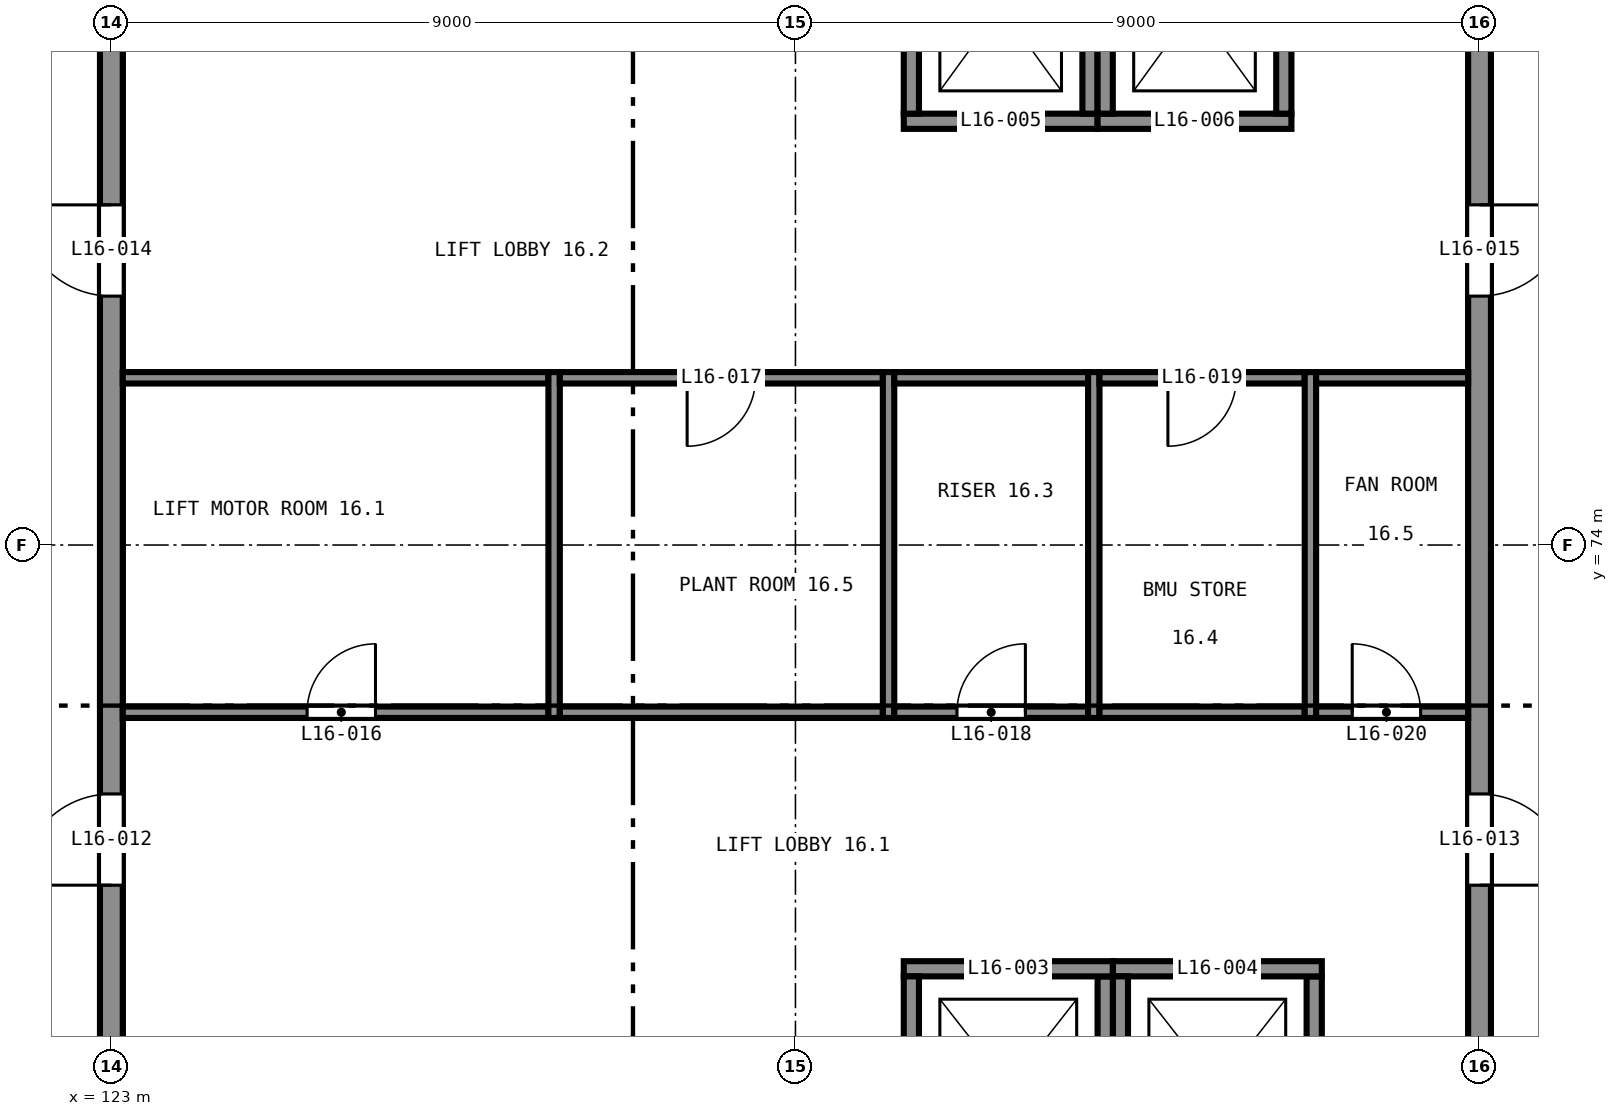
"""IFC4 building model, lengths in metres.
Left out: names, types, materials, properties, quantities, classifications, styles, units other than length and angle.
Written with IfcOpenShell. Run it as: python <this file> out.ifc"""

import sys

from ifc_helpers import new_model, si_unit, direction, frame, frame_2d, origin, place, context, subcontext, project, spatial, rectangle, extrude, element, fill, save


model = new_model("IFC4")
c1 = context("Model", 3, precision=1e-05, world=origin(), true_north=direction((0.0, 1.0)))
c2 = subcontext(c1, "Body", "Model", "MODEL_VIEW")
j1 = project(units=[si_unit("LENGTHUNIT", "METRE"), si_unit("PLANEANGLEUNIT", "RADIAN")], contexts=[c1])
p1 = place(None, origin())
s1 = spatial("IfcSite", under=j1, at=p1, CompositionType="ELEMENT")
p2 = place(p1, origin())
s2 = spatial("IfcBuilding", under=s1, at=p2, CompositionType="ELEMENT")
p3 = place(p2, frame((0.0, 0.0, 65.5)))
s3 = spatial("IfcBuildingStorey", under=s2, at=p3, CompositionType="ELEMENT", Elevation=65.5)
p4 = place(p3, frame((141.0, 65.15, 0.0), z_axis=(0.0, 0.0, 1.0), x_axis=(0.0, 1.0, 0.0)))
e1 = element("IfcWall", 1, at=p4, inside=s3, PredefinedType="SHEAR", context=c2, shape_type="SweptSolid", body=[
    extrude(rectangle(XDim=17.7, YDim=0.3, at=frame_2d((8.85, 0.0))), origin(), (0.0, 0.0, 1.0), 4.7),
])
p5 = place(p4, frame((4.375, 0.0, 0.0)))
e2 = element("IfcOpeningElement", 2, at=p5, cuts=e1, PredefinedType="OPENING", context=c2, shape_type="SweptSolid", body=[
    extrude(rectangle(XDim=1.2, YDim=2.1, at=frame_2d((0.6, 1.05))), frame((0.0, 0.16, 0.0), z_axis=(0.0, -1.0, 0.0), x_axis=(1.0, 0.0, 0.0)), (0.0, 0.0, 1.0), 0.32),
])
p6 = place(p4, frame((12.125, 0.0, 0.0)))
e3 = element("IfcOpeningElement", 3, at=p6, cuts=e1, PredefinedType="OPENING", context=c2, shape_type="SweptSolid", body=[
    extrude(rectangle(XDim=1.2, YDim=2.1, at=frame_2d((0.6, 1.05))), frame((0.0, 0.16, 0.0), z_axis=(0.0, -1.0, 0.0), x_axis=(1.0, 0.0, 0.0)), (0.0, 0.0, 1.0), 0.32),
])
p7 = place(p3, frame((123.0, 82.85, 0.0), z_axis=(0.0, 0.0, 1.0), x_axis=(0.0, -1.0, 0.0)))
e4 = element("IfcWall", 4, at=p7, inside=s3, PredefinedType="SHEAR", context=c2, shape_type="SweptSolid", body=[
    extrude(rectangle(XDim=17.7, YDim=0.3, at=frame_2d((8.85, 0.0))), origin(), (0.0, 0.0, 1.0), 4.7),
])
p8 = place(p7, frame((12.125, 0.0, 0.0)))
e5 = element("IfcOpeningElement", 5, at=p8, cuts=e4, PredefinedType="OPENING", context=c2, shape_type="SweptSolid", body=[
    extrude(rectangle(XDim=1.2, YDim=2.1, at=frame_2d((0.6, 1.05))), frame((0.0, 0.16, 0.0), z_axis=(0.0, -1.0, 0.0), x_axis=(1.0, 0.0, 0.0)), (0.0, 0.0, 1.0), 0.32),
])
p9 = place(p7, frame((4.375, 0.0, 0.0)))
e6 = element("IfcOpeningElement", 6, at=p9, cuts=e4, PredefinedType="OPENING", context=c2, shape_type="SweptSolid", body=[
    extrude(rectangle(XDim=1.2, YDim=2.1, at=frame_2d((0.6, 1.05))), frame((0.0, 0.16, 0.0), z_axis=(0.0, -1.0, 0.0), x_axis=(1.0, 0.0, 0.0)), (0.0, 0.0, 1.0), 0.32),
])
p10 = place(p3, frame((136.075, 65.425, 0.0), z_axis=(0.0, 0.0, 1.0), x_axis=(0.0, 1.0, 0.0)))
e7 = element("IfcWall", 7, at=p10, inside=s3, PredefinedType="SHEAR", context=c2, shape_type="SweptSolid", body=[
    extrude(rectangle(XDim=2.9, YDim=0.2, at=frame_2d((1.45, 0.0))), origin(), (0.0, 0.0, 1.0), 4.7),
])
p11 = place(p3, frame((136.175, 68.425, 0.0), z_axis=(0.0, 0.0, 1.0), x_axis=(-1.0, 0.0, 0.0)))
e8 = element("IfcWall", 8, at=p11, inside=s3, PredefinedType="SHEAR", context=c2, shape_type="SweptSolid", body=[
    extrude(rectangle(XDim=2.75, YDim=0.2, at=frame_2d((1.375, 0.0))), origin(), (0.0, 0.0, 1.0), 4.7),
])
p12 = place(p11, frame((0.825, 0.0, 0.0)))
e9 = element("IfcOpeningElement", 9, at=p12, cuts=e8, PredefinedType="OPENING", context=c2, shape_type="SweptSolid", body=[
    extrude(rectangle(XDim=1.1, YDim=2.1, at=frame_2d((0.55, 1.05))), frame((0.0, 0.11, 0.0), z_axis=(0.0, -1.0, 0.0), x_axis=(1.0, 0.0, 0.0)), (0.0, 0.0, 1.0), 0.22),
])
for number, where, z_axis, x_axis in (
    (10, (133.525, 68.325, 0.0), (0.0, 0.0, 1.0), (0.0, -1.0, 0.0)),
    (11, (138.825, 65.425, 0.0), (0.0, 0.0, 1.0), (0.0, 1.0, 0.0)),
):
    element("IfcWall", number, at=place(p3, frame(where, z_axis=z_axis, x_axis=x_axis)), inside=s3, PredefinedType="SHEAR", context=c2, shape_type="SweptSolid", body=[
        extrude(rectangle(XDim=2.9, YDim=0.2, at=frame_2d((1.45, 0.0))), origin(), (0.0, 0.0, 1.0), 4.7),
    ])
p13 = place(p3, frame((138.925, 68.425, 0.0), z_axis=(0.0, 0.0, 1.0), x_axis=(-1.0, 0.0, 0.0)))
e12 = element("IfcWall", 12, at=p13, inside=s3, PredefinedType="SHEAR", context=c2, shape_type="SweptSolid", body=[
    extrude(rectangle(XDim=2.75, YDim=0.2, at=frame_2d((1.375, 0.0))), origin(), (0.0, 0.0, 1.0), 4.7),
])
p14 = place(p13, frame((0.825, 0.0, 0.0)))
e13 = element("IfcOpeningElement", 13, at=p14, cuts=e12, PredefinedType="OPENING", context=c2, shape_type="SweptSolid", body=[
    extrude(rectangle(XDim=1.1, YDim=2.1, at=frame_2d((0.55, 1.05))), frame((0.0, 0.11, 0.0), z_axis=(0.0, -1.0, 0.0), x_axis=(1.0, 0.0, 0.0)), (0.0, 0.0, 1.0), 0.22),
])
p15 = place(p3, frame((136.275, 68.325, 0.0), z_axis=(0.0, 0.0, 1.0), x_axis=(0.0, -1.0, 0.0)))
e14 = element("IfcWall", 14, at=p15, inside=s3, PredefinedType="SHEAR", context=c2, shape_type="SweptSolid", body=[
    extrude(rectangle(XDim=2.9, YDim=0.2, at=frame_2d((1.45, 0.0))), origin(), (0.0, 0.0, 1.0), 4.7),
])
p16 = place(p3, frame((133.425, 79.575, 0.0), z_axis=(0.0, 0.0, 1.0), x_axis=(1.0, 0.0, 0.0)))
e15 = element("IfcWall", 15, at=p16, inside=s3, PredefinedType="SHEAR", context=c2, shape_type="SweptSolid", body=[
    extrude(rectangle(XDim=2.55, YDim=0.2, at=frame_2d((1.275, 0.0))), origin(), (0.0, 0.0, 1.0), 4.7),
])
p17 = place(p16, frame((0.725, 0.0, 0.0)))
e16 = element("IfcOpeningElement", 16, at=p17, cuts=e15, PredefinedType="OPENING", context=c2, shape_type="SweptSolid", body=[
    extrude(rectangle(XDim=1.1, YDim=2.1, at=frame_2d((0.55, 1.05))), frame((0.0, 0.11, 0.0), z_axis=(0.0, -1.0, 0.0), x_axis=(1.0, 0.0, 0.0)), (0.0, 0.0, 1.0), 0.22),
])
for number, where, z_axis, x_axis in (
    (17, (135.875, 79.675, 0.0), (0.0, 0.0, 1.0), (0.0, 1.0, 0.0)),
    (18, (133.525, 82.475, 0.0), (0.0, 0.0, 1.0), (0.0, -1.0, 0.0)),
):
    element("IfcWall", number, at=place(p3, frame(where, z_axis=z_axis, x_axis=x_axis)), inside=s3, PredefinedType="SHEAR", context=c2, shape_type="SweptSolid", body=[
        extrude(rectangle(XDim=2.8, YDim=0.2, at=frame_2d((1.4, 0.0))), origin(), (0.0, 0.0, 1.0), 4.7),
    ])
p18 = place(p3, frame((135.975, 79.575, 0.0), z_axis=(0.0, 0.0, 1.0), x_axis=(1.0, 0.0, 0.0)))
e19 = element("IfcWall", 19, at=p18, inside=s3, PredefinedType="SHEAR", context=c2, shape_type="SweptSolid", body=[
    extrude(rectangle(XDim=2.55, YDim=0.2, at=frame_2d((1.275, 0.0))), origin(), (0.0, 0.0, 1.0), 4.7),
])
p19 = place(p18, frame((0.725, 0.0, 0.0)))
e20 = element("IfcOpeningElement", 20, at=p19, cuts=e19, PredefinedType="OPENING", context=c2, shape_type="SweptSolid", body=[
    extrude(rectangle(XDim=1.1, YDim=2.1, at=frame_2d((0.55, 1.05))), frame((0.0, 0.11, 0.0), z_axis=(0.0, -1.0, 0.0), x_axis=(1.0, 0.0, 0.0)), (0.0, 0.0, 1.0), 0.22),
])
for number, where, z_axis, x_axis in (
    (21, (138.425, 79.675, 0.0), (0.0, 0.0, 1.0), (0.0, 1.0, 0.0)),
    (22, (136.075, 82.475, 0.0), (0.0, 0.0, 1.0), (0.0, -1.0, 0.0)),
):
    element("IfcWall", number, at=place(p3, frame(where, z_axis=z_axis, x_axis=x_axis)), inside=s3, PredefinedType="SHEAR", context=c2, shape_type="SweptSolid", body=[
        extrude(rectangle(XDim=2.8, YDim=0.2, at=frame_2d((1.4, 0.0))), origin(), (0.0, 0.0, 1.0), 4.7),
    ])
p20 = place(p3, frame((128.825, 71.725, 0.0), z_axis=(0.0, 0.0, 1.0), x_axis=(0.0, 1.0, 0.0)))
e23 = element("IfcWall", 23, at=p20, inside=s3, PredefinedType="PARTITIONING", context=c2, shape_type="SweptSolid", body=[
    extrude(rectangle(XDim=4.55, YDim=0.15, at=frame_2d((2.275, 0.0))), origin(), (0.0, 0.0, 1.0), 4.7),
])
p21 = place(p3, frame((123.15, 71.8, 0.0), z_axis=(0.0, 0.0, 1.0), x_axis=(1.0, 0.0, 0.0)))
e24 = element("IfcWall", 24, at=p21, inside=s3, PredefinedType="PARTITIONING", context=c2, shape_type="SweptSolid", body=[
    extrude(rectangle(XDim=5.6, YDim=0.15, at=frame_2d((2.8, 0.0))), origin(), (0.0, 0.0, 1.0), 4.7),
])
p22 = place(p21, frame((2.425, 0.0, 0.0)))
e25 = element("IfcOpeningElement", 25, at=p22, cuts=e24, PredefinedType="OPENING", context=c2, shape_type="SweptSolid", body=[
    extrude(rectangle(XDim=0.9, YDim=2.1, at=frame_2d((0.45, 1.05))), frame((0.0, 0.085, 0.0), z_axis=(0.0, -1.0, 0.0), x_axis=(1.0, 0.0, 0.0)), (0.0, 0.0, 1.0), 0.17),
])
p23 = place(p3, frame((123.15, 76.2, 0.0), z_axis=(0.0, 0.0, 1.0), x_axis=(1.0, 0.0, 0.0)))
e26 = element("IfcWall", 26, at=p23, inside=s3, PredefinedType="PARTITIONING", context=c2, shape_type="SweptSolid", body=[
    extrude(rectangle(XDim=5.6, YDim=0.15, at=frame_2d((2.8, 0.0))), origin(), (0.0, 0.0, 1.0), 4.7),
])
p24 = place(p3, frame((133.225, 71.725, 0.0), z_axis=(0.0, 0.0, 1.0), x_axis=(0.0, 1.0, 0.0)))
e27 = element("IfcWall", 27, at=p24, inside=s3, PredefinedType="PARTITIONING", context=c2, shape_type="SweptSolid", body=[
    extrude(rectangle(XDim=4.55, YDim=0.15, at=frame_2d((2.275, 0.0))), origin(), (0.0, 0.0, 1.0), 4.7),
])
p25 = place(p3, frame((128.9, 71.8, 0.0), z_axis=(0.0, 0.0, 1.0), x_axis=(1.0, 0.0, 0.0)))
e28 = element("IfcWall", 28, at=p25, inside=s3, PredefinedType="PARTITIONING", context=c2, shape_type="SweptSolid", body=[
    extrude(rectangle(XDim=4.25, YDim=0.15, at=frame_2d((2.125, 0.0))), origin(), (0.0, 0.0, 1.0), 4.7),
])
p26 = place(p3, frame((128.9, 76.2, 0.0), z_axis=(0.0, 0.0, 1.0), x_axis=(1.0, 0.0, 0.0)))
e29 = element("IfcWall", 29, at=p26, inside=s3, PredefinedType="PARTITIONING", context=c2, shape_type="SweptSolid", body=[
    extrude(rectangle(XDim=4.25, YDim=0.15, at=frame_2d((2.125, 0.0))), origin(), (0.0, 0.0, 1.0), 4.7),
])
p27 = place(p26, frame((1.675, 0.0, 0.0)))
e30 = element("IfcOpeningElement", 30, at=p27, cuts=e29, PredefinedType="OPENING", context=c2, shape_type="SweptSolid", body=[
    extrude(rectangle(XDim=0.9, YDim=2.1, at=frame_2d((0.45, 1.05))), frame((0.0, 0.085, 0.0), z_axis=(0.0, -1.0, 0.0), x_axis=(1.0, 0.0, 0.0)), (0.0, 0.0, 1.0), 0.17),
])
p28 = place(p3, frame((135.925, 71.725, 0.0), z_axis=(0.0, 0.0, 1.0), x_axis=(0.0, 1.0, 0.0)))
e31 = element("IfcWall", 31, at=p28, inside=s3, PredefinedType="PARTITIONING", context=c2, shape_type="SweptSolid", body=[
    extrude(rectangle(XDim=4.55, YDim=0.15, at=frame_2d((2.275, 0.0))), origin(), (0.0, 0.0, 1.0), 4.7),
])
p29 = place(p3, frame((133.3, 71.8, 0.0), z_axis=(0.0, 0.0, 1.0), x_axis=(1.0, 0.0, 0.0)))
e32 = element("IfcWall", 32, at=p29, inside=s3, PredefinedType="PARTITIONING", context=c2, shape_type="SweptSolid", body=[
    extrude(rectangle(XDim=2.55, YDim=0.15, at=frame_2d((1.275, 0.0))), origin(), (0.0, 0.0, 1.0), 4.7),
])
p30 = place(p29, frame((0.825, 0.0, 0.0)))
e33 = element("IfcOpeningElement", 33, at=p30, cuts=e32, PredefinedType="OPENING", context=c2, shape_type="SweptSolid", body=[
    extrude(rectangle(XDim=0.9, YDim=2.1, at=frame_2d((0.45, 1.05))), frame((0.0, 0.085, 0.0), z_axis=(0.0, -1.0, 0.0), x_axis=(1.0, 0.0, 0.0)), (0.0, 0.0, 1.0), 0.17),
])
p31 = place(p3, frame((133.3, 76.2, 0.0), z_axis=(0.0, 0.0, 1.0), x_axis=(1.0, 0.0, 0.0)))
e34 = element("IfcWall", 34, at=p31, inside=s3, PredefinedType="PARTITIONING", context=c2, shape_type="SweptSolid", body=[
    extrude(rectangle(XDim=2.55, YDim=0.15, at=frame_2d((1.275, 0.0))), origin(), (0.0, 0.0, 1.0), 4.7),
])
p32 = place(p3, frame((138.775, 71.725, 0.0), z_axis=(0.0, 0.0, 1.0), x_axis=(0.0, 1.0, 0.0)))
e35 = element("IfcWall", 35, at=p32, inside=s3, PredefinedType="PARTITIONING", context=c2, shape_type="SweptSolid", body=[
    extrude(rectangle(XDim=4.55, YDim=0.15, at=frame_2d((2.275, 0.0))), origin(), (0.0, 0.0, 1.0), 4.7),
])
p33 = place(p3, frame((136.0, 71.8, 0.0), z_axis=(0.0, 0.0, 1.0), x_axis=(1.0, 0.0, 0.0)))
e36 = element("IfcWall", 36, at=p33, inside=s3, PredefinedType="PARTITIONING", context=c2, shape_type="SweptSolid", body=[
    extrude(rectangle(XDim=2.7, YDim=0.15, at=frame_2d((1.35, 0.0))), origin(), (0.0, 0.0, 1.0), 4.7),
])
p34 = place(p3, frame((136.0, 76.2, 0.0), z_axis=(0.0, 0.0, 1.0), x_axis=(1.0, 0.0, 0.0)))
e37 = element("IfcWall", 37, at=p34, inside=s3, PredefinedType="PARTITIONING", context=c2, shape_type="SweptSolid", body=[
    extrude(rectangle(XDim=2.7, YDim=0.15, at=frame_2d((1.35, 0.0))), origin(), (0.0, 0.0, 1.0), 4.7),
])
p35 = place(p34, frame((0.9, 0.0, 0.0)))
e38 = element("IfcOpeningElement", 38, at=p35, cuts=e37, PredefinedType="OPENING", context=c2, shape_type="SweptSolid", body=[
    extrude(rectangle(XDim=0.9, YDim=2.1, at=frame_2d((0.45, 1.05))), frame((0.0, 0.085, 0.0), z_axis=(0.0, -1.0, 0.0), x_axis=(1.0, 0.0, 0.0)), (0.0, 0.0, 1.0), 0.17),
])
p36 = place(p3, frame((138.85, 71.8, 0.0), z_axis=(0.0, 0.0, 1.0), x_axis=(1.0, 0.0, 0.0)))
e39 = element("IfcWall", 39, at=p36, inside=s3, PredefinedType="PARTITIONING", context=c2, shape_type="SweptSolid", body=[
    extrude(rectangle(XDim=2.0, YDim=0.15, at=frame_2d((1.0, 0.0))), origin(), (0.0, 0.0, 1.0), 4.7),
])
p37 = place(p36, frame((0.475, 0.0, 0.0)))
e40 = element("IfcOpeningElement", 40, at=p37, cuts=e39, PredefinedType="OPENING", context=c2, shape_type="SweptSolid", body=[
    extrude(rectangle(XDim=0.9, YDim=2.1, at=frame_2d((0.45, 1.05))), frame((0.0, 0.085, 0.0), z_axis=(0.0, -1.0, 0.0), x_axis=(1.0, 0.0, 0.0)), (0.0, 0.0, 1.0), 0.17),
])
p38 = place(p3, frame((138.85, 76.2, 0.0), z_axis=(0.0, 0.0, 1.0), x_axis=(1.0, 0.0, 0.0)))
e41 = element("IfcWall", 41, at=p38, inside=s3, PredefinedType="PARTITIONING", context=c2, shape_type="SweptSolid", body=[
    extrude(rectangle(XDim=2.0, YDim=0.15, at=frame_2d((1.0, 0.0))), origin(), (0.0, 0.0, 1.0), 4.7),
])
p39 = place(p12, origin())
e42 = element("IfcDoor", 42, at=p39, inside=s3, OperationType="SLIDING_TO_LEFT", PredefinedType="DOOR", context=c2, shape_type="SweptSolid", body=[
    extrude(rectangle(XDim=1.1, YDim=2.1, at=frame_2d((0.55, 1.05))), frame((0.0, 0.025, 0.0), z_axis=(0.0, -1.0, 0.0), x_axis=(1.0, 0.0, 0.0)), (0.0, 0.0, 1.0), 0.05),
])
fill(e9, e42)
p40 = place(p14, origin())
e43 = element("IfcDoor", 43, at=p40, inside=s3, OperationType="SLIDING_TO_LEFT", PredefinedType="DOOR", context=c2, shape_type="SweptSolid", body=[
    extrude(rectangle(XDim=1.1, YDim=2.1, at=frame_2d((0.55, 1.05))), frame((0.0, 0.025, 0.0), z_axis=(0.0, -1.0, 0.0), x_axis=(1.0, 0.0, 0.0)), (0.0, 0.0, 1.0), 0.05),
])
fill(e13, e43)
p41 = place(p17, origin())
e44 = element("IfcDoor", 44, at=p41, inside=s3, OperationType="SLIDING_TO_LEFT", PredefinedType="DOOR", context=c2, shape_type="SweptSolid", body=[
    extrude(rectangle(XDim=1.1, YDim=2.1, at=frame_2d((0.55, 1.05))), frame((0.0, 0.025, 0.0), z_axis=(0.0, -1.0, 0.0), x_axis=(1.0, 0.0, 0.0)), (0.0, 0.0, 1.0), 0.05),
])
fill(e16, e44)
p42 = place(p19, origin())
e45 = element("IfcDoor", 45, at=p42, inside=s3, OperationType="SLIDING_TO_LEFT", PredefinedType="DOOR", context=c2, shape_type="SweptSolid", body=[
    extrude(rectangle(XDim=1.1, YDim=2.1, at=frame_2d((0.55, 1.05))), frame((0.0, 0.025, 0.0), z_axis=(0.0, -1.0, 0.0), x_axis=(1.0, 0.0, 0.0)), (0.0, 0.0, 1.0), 0.05),
])
fill(e20, e45)
p43 = place(p8, frame((1.2, 0.0, 0.0), z_axis=(0.0, 0.0, 1.0), x_axis=(-1.0, 0.0, 0.0)))
e46 = element("IfcDoor", 46, at=p43, inside=s3, OperationType="SINGLE_SWING_RIGHT", PredefinedType="DOOR", context=c2, shape_type="SweptSolid", body=[
    extrude(rectangle(XDim=1.2, YDim=2.1, at=frame_2d((0.6, 1.05))), frame((0.0, 0.025, 0.0), z_axis=(0.0, -1.0, 0.0), x_axis=(1.0, 0.0, 0.0)), (0.0, 0.0, 1.0), 0.05),
])
fill(e5, e46)
p44 = place(p5, frame((1.2, 0.0, 0.0), z_axis=(0.0, 0.0, 1.0), x_axis=(-1.0, 0.0, 0.0)))
e47 = element("IfcDoor", 47, at=p44, inside=s3, OperationType="SINGLE_SWING_LEFT", PredefinedType="DOOR", context=c2, shape_type="SweptSolid", body=[
    extrude(rectangle(XDim=1.2, YDim=2.1, at=frame_2d((0.6, 1.05))), frame((0.0, 0.025, 0.0), z_axis=(0.0, -1.0, 0.0), x_axis=(1.0, 0.0, 0.0)), (0.0, 0.0, 1.0), 0.05),
])
fill(e2, e47)
p45 = place(p9, frame((1.2, 0.0, 0.0), z_axis=(0.0, 0.0, 1.0), x_axis=(-1.0, 0.0, 0.0)))
e48 = element("IfcDoor", 48, at=p45, inside=s3, OperationType="SINGLE_SWING_LEFT", PredefinedType="DOOR", context=c2, shape_type="SweptSolid", body=[
    extrude(rectangle(XDim=1.2, YDim=2.1, at=frame_2d((0.6, 1.05))), frame((0.0, 0.025, 0.0), z_axis=(0.0, -1.0, 0.0), x_axis=(1.0, 0.0, 0.0)), (0.0, 0.0, 1.0), 0.05),
])
fill(e6, e48)
p46 = place(p6, frame((1.2, 0.0, 0.0), z_axis=(0.0, 0.0, 1.0), x_axis=(-1.0, 0.0, 0.0)))
e49 = element("IfcDoor", 49, at=p46, inside=s3, OperationType="SINGLE_SWING_RIGHT", PredefinedType="DOOR", context=c2, shape_type="SweptSolid", body=[
    extrude(rectangle(XDim=1.2, YDim=2.1, at=frame_2d((0.6, 1.05))), frame((0.0, 0.025, 0.0), z_axis=(0.0, -1.0, 0.0), x_axis=(1.0, 0.0, 0.0)), (0.0, 0.0, 1.0), 0.05),
])
fill(e3, e49)
p47 = place(p22, origin())
e50 = element("IfcDoor", 50, at=p47, inside=s3, OperationType="SINGLE_SWING_LEFT", PredefinedType="DOOR", context=c2, shape_type="SweptSolid", body=[
    extrude(rectangle(XDim=0.9, YDim=2.1, at=frame_2d((0.45, 1.05))), frame((0.0, 0.025, 0.0), z_axis=(0.0, -1.0, 0.0), x_axis=(1.0, 0.0, 0.0)), (0.0, 0.0, 1.0), 0.05),
])
fill(e25, e50)
p48 = place(p27, frame((0.9, 0.0, 0.0), z_axis=(0.0, 0.0, 1.0), x_axis=(-1.0, 0.0, 0.0)))
e51 = element("IfcDoor", 51, at=p48, inside=s3, OperationType="SINGLE_SWING_LEFT", PredefinedType="DOOR", context=c2, shape_type="SweptSolid", body=[
    extrude(rectangle(XDim=0.9, YDim=2.1, at=frame_2d((0.45, 1.05))), frame((0.0, 0.025, 0.0), z_axis=(0.0, -1.0, 0.0), x_axis=(1.0, 0.0, 0.0)), (0.0, 0.0, 1.0), 0.05),
])
fill(e30, e51)
p49 = place(p30, origin())
e52 = element("IfcDoor", 52, at=p49, inside=s3, OperationType="SINGLE_SWING_LEFT", PredefinedType="DOOR", context=c2, shape_type="SweptSolid", body=[
    extrude(rectangle(XDim=0.9, YDim=2.1, at=frame_2d((0.45, 1.05))), frame((0.0, 0.025, 0.0), z_axis=(0.0, -1.0, 0.0), x_axis=(1.0, 0.0, 0.0)), (0.0, 0.0, 1.0), 0.05),
])
fill(e33, e52)
p50 = place(p35, frame((0.9, 0.0, 0.0), z_axis=(0.0, 0.0, 1.0), x_axis=(-1.0, 0.0, 0.0)))
e53 = element("IfcDoor", 53, at=p50, inside=s3, OperationType="SINGLE_SWING_LEFT", PredefinedType="DOOR", context=c2, shape_type="SweptSolid", body=[
    extrude(rectangle(XDim=0.9, YDim=2.1, at=frame_2d((0.45, 1.05))), frame((0.0, 0.025, 0.0), z_axis=(0.0, -1.0, 0.0), x_axis=(1.0, 0.0, 0.0)), (0.0, 0.0, 1.0), 0.05),
])
fill(e38, e53)
p51 = place(p37, origin())
e54 = element("IfcDoor", 54, at=p51, inside=s3, OperationType="SINGLE_SWING_RIGHT", PredefinedType="DOOR", context=c2, shape_type="SweptSolid", body=[
    extrude(rectangle(XDim=0.9, YDim=2.1, at=frame_2d((0.45, 1.05))), frame((0.0, 0.025, 0.0), z_axis=(0.0, -1.0, 0.0), x_axis=(1.0, 0.0, 0.0)), (0.0, 0.0, 1.0), 0.05),
])
fill(e40, e54)
save(model, sys.argv[1])
